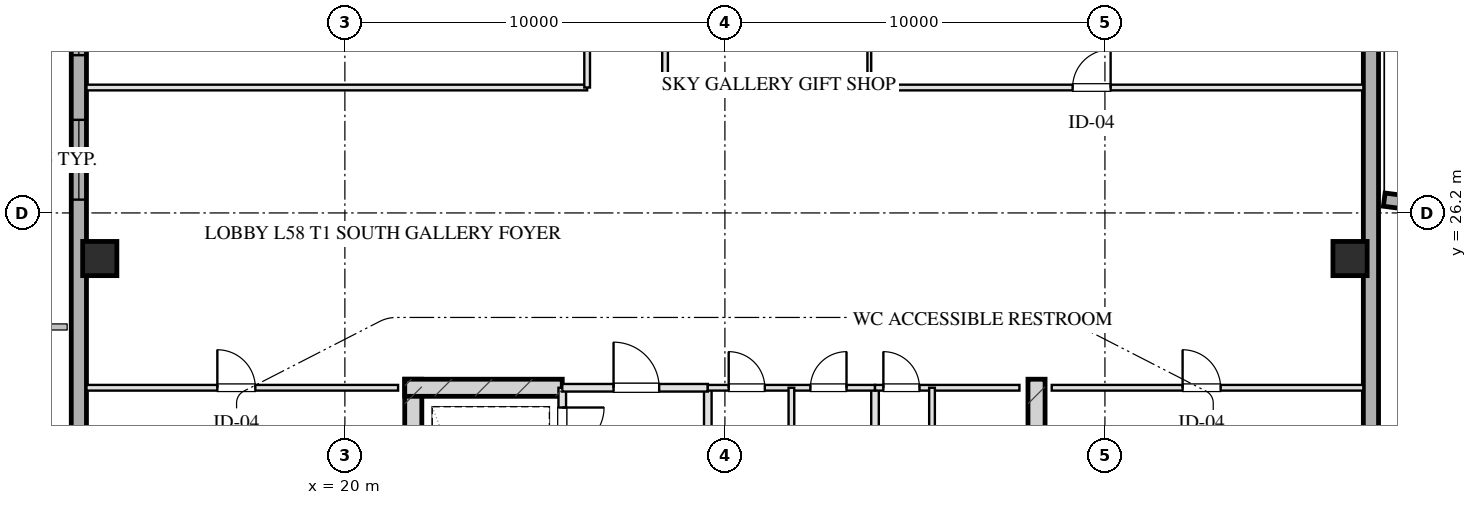
"""IFC4 building model, lengths in metres.
Left out: names, types, materials, properties, quantities, classifications, styles, units other than length and angle.
Written with IfcOpenShell. Run it as: python <this file> out.ifc"""

import sys

from ifc_helpers import new_model, si_unit, direction, frame, frame_2d, origin, origin_2d, place, context, subcontext, project, spatial, rectangle, hollow_rectangle, extrude, element, fill, save


model = new_model("IFC4")
c1 = context("Model", 3, precision=1e-05, world=origin(), true_north=direction((0.0, 1.0)))
c2 = subcontext(c1, "Body", "Model", "MODEL_VIEW")
j1 = project(units=[si_unit("LENGTHUNIT", "METRE"), si_unit("PLANEANGLEUNIT", "RADIAN")], contexts=[c1])
p1 = place(None, origin())
s1 = spatial("IfcSite", under=j1, at=p1, CompositionType="ELEMENT")
p2 = place(p1, origin())
s2 = spatial("IfcBuilding", under=s1, at=p2, CompositionType="ELEMENT")
p3 = place(p2, frame((0.0, 0.0, 216.2)))
s3 = spatial("IfcBuildingStorey", under=s2, at=p3, CompositionType="ELEMENT", Elevation=216.2)
for number, where, z_axis, x_axis in (
    (1, (21.8, 21.825, 0.0), (0.0, 0.0, 1.0), (0.0, -1.0, 0.0)),
    (2, (38.2, 21.825, 0.0), (0.0, 0.0, 1.0), (0.0, -1.0, 0.0)),
):
    element("IfcWall", number, at=place(p3, frame(where, z_axis=z_axis, x_axis=x_axis)), inside=s3, PredefinedType="SHEAR", context=c2, shape_type="SweptSolid", body=[
        extrude(rectangle(XDim=9.33, YDim=0.45, at=frame_2d((4.665, 0.0))), origin(), (0.0, 0.0, 1.0), 3.45),
    ])
p4 = place(p3, frame((21.575, 21.6, 0.0), z_axis=(0.0, 0.0, 1.0), x_axis=(1.0, 0.0, 0.0)))
e3 = element("IfcWall", 3, at=p4, inside=s3, PredefinedType="SHEAR", context=c2, shape_type="SweptSolid", body=[
    extrude(rectangle(XDim=4.145, YDim=0.45, at=frame_2d((2.073, 0.0))), origin(), (0.0, 0.0, 1.0), 3.45),
])
for number, where, z_axis, x_axis in (
    (4, (13.55, 25.0, 0.0), (0.0, 0.0, 1.0), (1.0, 0.0, 0.0)),
    (5, (46.45, 25.0, 0.0), (0.0, 0.0, 1.0), (1.0, 0.0, 0.0)),
):
    element("IfcColumn", number, at=place(p3, frame(where, z_axis=z_axis, x_axis=x_axis)), inside=s3, PredefinedType="COLUMN", context=c2, shape_type="SweptSolid", body=[
        extrude(hollow_rectangle(XDim=0.9, YDim=0.9, WallThickness=0.032, at=origin_2d()), origin(), (0.0, 0.0, 1.0), 3.451),
    ])
p5 = place(p3, frame((13.0, 10.8, 0.0), z_axis=(0.0, 0.0, 1.0), x_axis=(0.0, 1.0, 0.0)))
e6 = element("IfcWall", 6, at=p5, inside=s3, PredefinedType="SOLIDWALL", context=c2, shape_type="SweptSolid", body=[
    extrude(rectangle(XDim=46.4, YDim=0.4, at=frame_2d((23.2, 0.0))), origin(), (0.0, 0.0, 1.0), 2.55),
])
p6 = place(p5, frame((15.75, 0.0, 0.75)))
e7 = element("IfcOpeningElement", 7, at=p6, cuts=e6, PredefinedType="OPENING", context=c2, shape_type="SweptSolid", body=[
    extrude(rectangle(XDim=2.1, YDim=1.4, at=frame_2d((1.05, 0.7))), frame((0.0, 0.21, 0.0), z_axis=(0.0, -1.0, 0.0), x_axis=(1.0, 0.0, 0.0)), (0.0, 0.0, 1.0), 0.42),
])
p7 = place(p5, frame((19.55, 0.0, 0.75)))
e8 = element("IfcOpeningElement", 8, at=p7, cuts=e6, PredefinedType="OPENING", context=c2, shape_type="SweptSolid", body=[
    extrude(rectangle(XDim=2.1, YDim=1.4, at=frame_2d((1.05, 0.7))), frame((0.0, 0.21, 0.0), z_axis=(0.0, -1.0, 0.0), x_axis=(1.0, 0.0, 0.0)), (0.0, 0.0, 1.0), 0.42),
])
p8 = place(p5, frame((24.75, 0.0, 0.75)))
e9 = element("IfcOpeningElement", 9, at=p8, cuts=e6, PredefinedType="OPENING", context=c2, shape_type="SweptSolid", body=[
    extrude(rectangle(XDim=2.1, YDim=1.4, at=frame_2d((1.05, 0.7))), frame((0.0, 0.21, 0.0), z_axis=(0.0, -1.0, 0.0), x_axis=(1.0, 0.0, 0.0)), (0.0, 0.0, 1.0), 0.42),
])
p9 = place(p5, frame((28.55, 0.0, 0.75)))
e10 = element("IfcOpeningElement", 10, at=p9, cuts=e6, PredefinedType="OPENING", context=c2, shape_type="SweptSolid", body=[
    extrude(rectangle(XDim=2.1, YDim=1.4, at=frame_2d((1.05, 0.7))), frame((0.0, 0.21, 0.0), z_axis=(0.0, -1.0, 0.0), x_axis=(1.0, 0.0, 0.0)), (0.0, 0.0, 1.0), 0.42),
])
p10 = place(p3, frame((47.0, 57.2, 0.0), z_axis=(0.0, 0.0, 1.0), x_axis=(0.0, -1.0, 0.0)))
e11 = element("IfcWall", 11, at=p10, inside=s3, PredefinedType="SOLIDWALL", context=c2, shape_type="SweptSolid", body=[
    extrude(rectangle(XDim=46.4, YDim=0.4, at=frame_2d((23.2, 0.0))), origin(), (0.0, 0.0, 1.0), 2.55),
])
p11 = place(p10, frame((16.4, 0.0, 0.0)))
e12 = element("IfcOpeningElement", 12, at=p11, cuts=e11, PredefinedType="OPENING", context=c2, shape_type="SweptSolid", body=[
    extrude(rectangle(XDim=1.8, YDim=2.2, at=frame_2d((0.9, 1.1))), frame((0.0, 0.21, 0.0), z_axis=(0.0, -1.0, 0.0), x_axis=(1.0, 0.0, 0.0)), (0.0, 0.0, 1.0), 0.42),
])
p12 = place(p3, frame((47.35, 26.55, 0.0), z_axis=(0.0, 0.0, 1.0), x_axis=(0.991732402874, -0.128323189996, 0.0)))
e13 = element("IfcWall", 13, at=p12, inside=s3, PredefinedType="SOLIDWALL", context=c2, shape_type="SweptSolid", body=[
    extrude(rectangle(XDim=31.725, YDim=0.35, at=frame_2d((15.862, 0.0))), origin(), (0.0, 0.0, 1.0), 3.15),
])
p13 = place(p3, frame((25.72, 21.6, 0.0), z_axis=(0.0, 0.0, 1.0), x_axis=(0.0, -1.0, 0.0)))
e14 = element("IfcWall", 14, at=p13, inside=s3, PredefinedType="PARTITIONING", context=c2, shape_type="SweptSolid", body=[
    extrude(rectangle(XDim=1.9, YDim=0.2, at=frame_2d((0.95, 0.0))), origin(), (0.0, 0.0, 1.0), 3.155),
])
p14 = place(p13, frame((0.52, 0.0, 0.0)))
e15 = element("IfcOpeningElement", 15, at=p14, cuts=e14, PredefinedType="OPENING", context=c2, shape_type="SweptSolid", body=[
    extrude(rectangle(XDim=1.1, YDim=2.05, at=frame_2d((0.55, 1.025))), frame((0.0, 0.11, 0.0), z_axis=(0.0, -1.0, 0.0), x_axis=(1.0, 0.0, 0.0)), (0.0, 0.0, 1.0), 0.22),
])
p15 = place(p3, frame((29.55, 21.6, 0.0), z_axis=(0.0, 0.0, 1.0), x_axis=(0.0, -1.0, 0.0)))
e16 = element("IfcWall", 16, at=p15, inside=s3, PredefinedType="PARTITIONING", context=c2, shape_type="SweptSolid", body=[
    extrude(rectangle(XDim=8.43, YDim=0.2, at=frame_2d((4.215, 0.0))), origin(), (0.0, 0.0, 1.0), 3.155),
])
p16 = place(p3, frame((25.72, 21.6, 0.0), z_axis=(0.0, 0.0, 1.0), x_axis=(1.0, 0.0, 0.0)))
e17 = element("IfcWall", 17, at=p16, inside=s3, PredefinedType="PARTITIONING", context=c2, shape_type="SweptSolid", body=[
    extrude(rectangle(XDim=3.83, YDim=0.2, at=frame_2d((1.915, 0.0))), origin(), (0.0, 0.0, 1.0), 3.155),
])
p17 = place(p16, frame((1.35, 0.0, 0.0)))
e18 = element("IfcOpeningElement", 18, at=p17, cuts=e17, PredefinedType="OPENING", context=c2, shape_type="SweptSolid", body=[
    extrude(rectangle(XDim=1.2, YDim=2.05, at=frame_2d((0.6, 1.025))), frame((0.0, 0.11, 0.0), z_axis=(0.0, -1.0, 0.0), x_axis=(1.0, 0.0, 0.0)), (0.0, 0.0, 1.0), 0.22),
])
p18 = place(p3, frame((33.95, 21.6, 0.0), z_axis=(0.0, 0.0, 1.0), x_axis=(0.0, -1.0, 0.0)))
e19 = element("IfcWall", 19, at=p18, inside=s3, PredefinedType="PARTITIONING", context=c2, shape_type="SweptSolid", body=[
    extrude(rectangle(XDim=8.43, YDim=0.2, at=frame_2d((4.215, 0.0))), origin(), (0.0, 0.0, 1.0), 3.155),
])
p19 = place(p3, frame((29.55, 21.6, 0.0), z_axis=(0.0, 0.0, 1.0), x_axis=(1.0, 0.0, 0.0)))
e20 = element("IfcWall", 20, at=p19, inside=s3, PredefinedType="PARTITIONING", context=c2, shape_type="SweptSolid", body=[
    extrude(rectangle(XDim=4.4, YDim=0.15, at=frame_2d((2.2, 0.0))), origin(), (0.0, 0.0, 1.0), 3.155),
])
p20 = place(p19, frame((0.55, 0.0, 0.0)))
e21 = element("IfcOpeningElement", 21, at=p20, cuts=e20, PredefinedType="OPENING", context=c2, shape_type="SweptSolid", body=[
    extrude(rectangle(XDim=0.95, YDim=2.05, at=frame_2d((0.475, 1.025))), frame((0.0, 0.085, 0.0), z_axis=(0.0, -1.0, 0.0), x_axis=(1.0, 0.0, 0.0)), (0.0, 0.0, 1.0), 0.17),
])
p21 = place(p19, frame((2.7, 0.0, 0.0)))
e22 = element("IfcOpeningElement", 22, at=p21, cuts=e20, PredefinedType="OPENING", context=c2, shape_type="SweptSolid", body=[
    extrude(rectangle(XDim=0.95, YDim=2.05, at=frame_2d((0.475, 1.025))), frame((0.0, 0.085, 0.0), z_axis=(0.0, -1.0, 0.0), x_axis=(1.0, 0.0, 0.0)), (0.0, 0.0, 1.0), 0.17),
])
p22 = place(p3, frame((31.75, 21.6, 0.0), z_axis=(0.0, 0.0, 1.0), x_axis=(0.0, -1.0, 0.0)))
e23 = element("IfcWall", 23, at=p22, inside=s3, PredefinedType="PARTITIONING", context=c2, shape_type="SweptSolid", body=[
    extrude(rectangle(XDim=8.43, YDim=0.15, at=frame_2d((4.215, 0.0))), origin(), (0.0, 0.0, 1.0), 3.155),
])
p23 = place(p3, frame((33.95, 21.6, 0.0), z_axis=(0.0, 0.0, 1.0), x_axis=(1.0, 0.0, 0.0)))
e24 = element("IfcWall", 24, at=p23, inside=s3, PredefinedType="PARTITIONING", context=c2, shape_type="SweptSolid", body=[
    extrude(rectangle(XDim=3.8, YDim=0.15, at=frame_2d((1.9, 0.0))), origin(), (0.0, 0.0, 1.0), 3.155),
])
p24 = place(p23, frame((0.22, 0.0, 0.0)))
e25 = element("IfcOpeningElement", 25, at=p24, cuts=e24, PredefinedType="OPENING", context=c2, shape_type="SweptSolid", body=[
    extrude(rectangle(XDim=0.95, YDim=2.05, at=frame_2d((0.475, 1.025))), frame((0.0, 0.085, 0.0), z_axis=(0.0, -1.0, 0.0), x_axis=(1.0, 0.0, 0.0)), (0.0, 0.0, 1.0), 0.17),
])
p25 = place(p3, frame((35.45, 21.6, 0.0), z_axis=(0.0, 0.0, 1.0), x_axis=(0.0, -1.0, 0.0)))
e26 = element("IfcWall", 26, at=p25, inside=s3, PredefinedType="PARTITIONING", context=c2, shape_type="SweptSolid", body=[
    extrude(rectangle(XDim=8.43, YDim=0.15, at=frame_2d((4.215, 0.0))), origin(), (0.0, 0.0, 1.0), 2.745),
])
p26 = place(p25, frame((2.55, 0.0, 0.0)))
e27 = element("IfcOpeningElement", 27, at=p26, cuts=e26, PredefinedType="OPENING", context=c2, shape_type="SweptSolid", body=[
    extrude(rectangle(XDim=0.95, YDim=2.05, at=frame_2d((0.475, 1.025))), frame((0.0, 0.085, 0.0), z_axis=(0.0, -1.0, 0.0), x_axis=(1.0, 0.0, 0.0)), (0.0, 0.0, 1.0), 0.17),
])
p27 = place(p25, frame((5.8, 0.0, 0.0)))
e28 = element("IfcOpeningElement", 28, at=p27, cuts=e26, PredefinedType="OPENING", context=c2, shape_type="SweptSolid", body=[
    extrude(rectangle(XDim=0.9, YDim=2.05, at=frame_2d((0.45, 1.025))), frame((0.0, 0.085, 0.0), z_axis=(0.0, -1.0, 0.0), x_axis=(1.0, 0.0, 0.0)), (0.0, 0.0, 1.0), 0.17),
])
p28 = place(p3, frame((13.2, 21.6, 0.0), z_axis=(0.0, 0.0, 1.0), x_axis=(1.0, 0.0, 0.0)))
e29 = element("IfcWall", 29, at=p28, inside=s3, PredefinedType="PARTITIONING", context=c2, shape_type="SweptSolid", body=[
    extrude(rectangle(XDim=8.2, YDim=0.15, at=frame_2d((4.1, 0.0))), origin(), (0.0, 0.0, 1.0), 3.155),
])
p29 = place(p28, frame((3.444, 0.0, 0.0)))
e30 = element("IfcOpeningElement", 30, at=p29, cuts=e29, PredefinedType="OPENING", context=c2, shape_type="SweptSolid", body=[
    extrude(rectangle(XDim=1.0, YDim=2.05, at=frame_2d((0.5, 1.025))), frame((0.0, 0.085, 0.0), z_axis=(0.0, -1.0, 0.0), x_axis=(1.0, 0.0, 0.0)), (0.0, 0.0, 1.0), 0.17),
])
p30 = place(p3, frame((38.6, 21.6, 0.0), z_axis=(0.0, 0.0, 1.0), x_axis=(1.0, 0.0, 0.0)))
e31 = element("IfcWall", 31, at=p30, inside=s3, PredefinedType="PARTITIONING", context=c2, shape_type="SweptSolid", body=[
    extrude(rectangle(XDim=8.2, YDim=0.15, at=frame_2d((4.1, 0.0))), origin(), (0.0, 0.0, 1.0), 3.155),
])
p31 = place(p30, frame((3.444, 0.0, 0.0)))
e32 = element("IfcOpeningElement", 32, at=p31, cuts=e31, PredefinedType="OPENING", context=c2, shape_type="SweptSolid", body=[
    extrude(rectangle(XDim=1.0, YDim=2.05, at=frame_2d((0.5, 1.025))), frame((0.0, 0.085, 0.0), z_axis=(0.0, -1.0, 0.0), x_axis=(1.0, 0.0, 0.0)), (0.0, 0.0, 1.0), 0.17),
])
p32 = place(p3, frame((13.2, 29.5, 0.0), z_axis=(0.0, 0.0, 1.0), x_axis=(1.0, 0.0, 0.0)))
e33 = element("IfcWall", 33, at=p32, inside=s3, PredefinedType="PARTITIONING", context=c2, shape_type="SweptSolid", body=[
    extrude(rectangle(XDim=13.175, YDim=0.15, at=frame_2d((6.587, 0.0))), origin(), (0.0, 0.0, 1.0), 3.155),
])
p33 = place(p3, frame((28.425, 29.5, 0.0), z_axis=(0.0, 0.0, 1.0), x_axis=(1.0, 0.0, 0.0)))
e34 = element("IfcWall", 34, at=p33, inside=s3, PredefinedType="PARTITIONING", context=c2, shape_type="SweptSolid", body=[
    extrude(rectangle(XDim=18.375, YDim=0.15, at=frame_2d((9.188, 0.0))), origin(), (0.0, 0.0, 1.0), 3.155),
])
p34 = place(p33, frame((10.725, 0.0, 0.0)))
e35 = element("IfcOpeningElement", 35, at=p34, cuts=e34, PredefinedType="OPENING", context=c2, shape_type="SweptSolid", body=[
    extrude(rectangle(XDim=1.0, YDim=2.05, at=frame_2d((0.5, 1.025))), frame((0.0, 0.085, 0.0), z_axis=(0.0, -1.0, 0.0), x_axis=(1.0, 0.0, 0.0)), (0.0, 0.0, 1.0), 0.17),
])
p35 = place(p3, frame((26.375, 29.5, 0.0), z_axis=(0.0, 0.0, 1.0), x_axis=(0.0, 1.0, 0.0)))
e36 = element("IfcWall", 36, at=p35, inside=s3, PredefinedType="PARTITIONING", context=c2, shape_type="SweptSolid", body=[
    extrude(rectangle(XDim=9.0, YDim=0.15, at=frame_2d((4.5, 0.0))), origin(), (0.0, 0.0, 1.0), 3.155),
])
p36 = place(p35, frame((1.16, 0.0, 0.0)))
e37 = element("IfcOpeningElement", 37, at=p36, cuts=e36, PredefinedType="OPENING", context=c2, shape_type="SweptSolid", body=[
    extrude(rectangle(XDim=0.85, YDim=2.05, at=frame_2d((0.425, 1.025))), frame((0.0, 0.085, 0.0), z_axis=(0.0, -1.0, 0.0), x_axis=(1.0, 0.0, 0.0)), (0.0, 0.0, 1.0), 0.17),
])
p37 = place(p35, frame((5.66, 0.0, 0.0)))
e38 = element("IfcOpeningElement", 38, at=p37, cuts=e36, PredefinedType="OPENING", context=c2, shape_type="SweptSolid", body=[
    extrude(rectangle(XDim=1.05, YDim=2.05, at=frame_2d((0.525, 1.025))), frame((0.0, 0.085, 0.0), z_axis=(0.0, -1.0, 0.0), x_axis=(1.0, 0.0, 0.0)), (0.0, 0.0, 1.0), 0.17),
])
p38 = place(p3, frame((28.425, 29.5, 0.0), z_axis=(0.0, 0.0, 1.0), x_axis=(0.0, 1.0, 0.0)))
e39 = element("IfcWall", 39, at=p38, inside=s3, PredefinedType="PARTITIONING", context=c2, shape_type="SweptSolid", body=[
    extrude(rectangle(XDim=9.0, YDim=0.15, at=frame_2d((4.5, 0.0))), origin(), (0.0, 0.0, 1.0), 3.155),
])
p39 = place(p38, frame((1.16, 0.0, 0.0)))
e40 = element("IfcOpeningElement", 40, at=p39, cuts=e39, PredefinedType="OPENING", context=c2, shape_type="SweptSolid", body=[
    extrude(rectangle(XDim=1.0, YDim=2.05, at=frame_2d((0.5, 1.025))), frame((0.0, 0.085, 0.0), z_axis=(0.0, -1.0, 0.0), x_axis=(1.0, 0.0, 0.0)), (0.0, 0.0, 1.0), 0.17),
])
p40 = place(p38, frame((5.66, 0.0, 0.0)))
e41 = element("IfcOpeningElement", 41, at=p40, cuts=e39, PredefinedType="OPENING", context=c2, shape_type="SweptSolid", body=[
    extrude(rectangle(XDim=1.0, YDim=2.05, at=frame_2d((0.5, 1.025))), frame((0.0, 0.085, 0.0), z_axis=(0.0, -1.0, 0.0), x_axis=(1.0, 0.0, 0.0)), (0.0, 0.0, 1.0), 0.17),
])
p41 = place(p3, frame((33.8, 29.5, 0.0), z_axis=(0.0, 0.0, 1.0), x_axis=(0.0, 1.0, 0.0)))
e42 = element("IfcWall", 42, at=p41, inside=s3, PredefinedType="MOVABLE", context=c2, shape_type="SweptSolid", body=[
    extrude(rectangle(XDim=3.32, YDim=0.1, at=frame_2d((1.66, 0.0))), origin(), (0.0, 0.0, 1.0), 3.155),
])
p42 = place(p6, origin())
e43 = element("IfcWindow", 43, at=p42, inside=s3, PartitioningType="TRIPLE_PANEL_VERTICAL", PredefinedType="WINDOW", context=c2, shape_type="SweptSolid", body=[
    extrude(rectangle(XDim=2.1, YDim=1.4, at=frame_2d((1.05, 0.7))), frame((0.0, 0.03, 0.0), z_axis=(0.0, -1.0, 0.0), x_axis=(1.0, 0.0, 0.0)), (0.0, 0.0, 1.0), 0.06),
])
fill(e7, e43)
p43 = place(p7, origin())
e44 = element("IfcWindow", 44, at=p43, inside=s3, PartitioningType="TRIPLE_PANEL_VERTICAL", PredefinedType="WINDOW", context=c2, shape_type="SweptSolid", body=[
    extrude(rectangle(XDim=2.1, YDim=1.4, at=frame_2d((1.05, 0.7))), frame((0.0, 0.03, 0.0), z_axis=(0.0, -1.0, 0.0), x_axis=(1.0, 0.0, 0.0)), (0.0, 0.0, 1.0), 0.06),
])
fill(e8, e44)
p44 = place(p14, origin())
e45 = element("IfcDoor", 45, at=p44, inside=s3, OperationType="SINGLE_SWING_LEFT", PredefinedType="DOOR", context=c2, shape_type="SweptSolid", body=[
    extrude(rectangle(XDim=1.1, YDim=2.05, at=frame_2d((0.55, 1.025))), frame((0.0, 0.025, 0.0), z_axis=(0.0, -1.0, 0.0), x_axis=(1.0, 0.0, 0.0)), (0.0, 0.0, 1.0), 0.05),
])
fill(e15, e45)
p45 = place(p17, origin())
e46 = element("IfcDoor", 46, at=p45, inside=s3, OperationType="SINGLE_SWING_LEFT", PredefinedType="DOOR", context=c2, shape_type="SweptSolid", body=[
    extrude(rectangle(XDim=1.2, YDim=2.05, at=frame_2d((0.6, 1.025))), frame((0.0, 0.025, 0.0), z_axis=(0.0, -1.0, 0.0), x_axis=(1.0, 0.0, 0.0)), (0.0, 0.0, 1.0), 0.05),
])
fill(e18, e46)
p46 = place(p20, origin())
e47 = element("IfcDoor", 47, at=p46, inside=s3, OperationType="SINGLE_SWING_LEFT", PredefinedType="DOOR", context=c2, shape_type="SweptSolid", body=[
    extrude(rectangle(XDim=0.95, YDim=2.05, at=frame_2d((0.475, 1.025))), frame((0.0, 0.025, 0.0), z_axis=(0.0, -1.0, 0.0), x_axis=(1.0, 0.0, 0.0)), (0.0, 0.0, 1.0), 0.05),
])
fill(e21, e47)
p47 = place(p21, origin())
e48 = element("IfcDoor", 48, at=p47, inside=s3, OperationType="SINGLE_SWING_RIGHT", PredefinedType="DOOR", context=c2, shape_type="SweptSolid", body=[
    extrude(rectangle(XDim=0.95, YDim=2.05, at=frame_2d((0.475, 1.025))), frame((0.0, 0.025, 0.0), z_axis=(0.0, -1.0, 0.0), x_axis=(1.0, 0.0, 0.0)), (0.0, 0.0, 1.0), 0.05),
])
fill(e22, e48)
p48 = place(p24, origin())
e49 = element("IfcDoor", 49, at=p48, inside=s3, OperationType="SINGLE_SWING_LEFT", PredefinedType="DOOR", context=c2, shape_type="SweptSolid", body=[
    extrude(rectangle(XDim=0.95, YDim=2.05, at=frame_2d((0.475, 1.025))), frame((0.0, 0.025, 0.0), z_axis=(0.0, -1.0, 0.0), x_axis=(1.0, 0.0, 0.0)), (0.0, 0.0, 1.0), 0.05),
])
fill(e25, e49)
p49 = place(p29, origin())
e50 = element("IfcDoor", 50, at=p49, inside=s3, OperationType="SINGLE_SWING_LEFT", PredefinedType="DOOR", context=c2, shape_type="SweptSolid", body=[
    extrude(rectangle(XDim=1.0, YDim=2.05, at=frame_2d((0.5, 1.025))), frame((0.0, 0.025, 0.0), z_axis=(0.0, -1.0, 0.0), x_axis=(1.0, 0.0, 0.0)), (0.0, 0.0, 1.0), 0.05),
])
fill(e30, e50)
p50 = place(p31, origin())
e51 = element("IfcDoor", 51, at=p50, inside=s3, OperationType="SINGLE_SWING_LEFT", PredefinedType="DOOR", context=c2, shape_type="SweptSolid", body=[
    extrude(rectangle(XDim=1.0, YDim=2.05, at=frame_2d((0.5, 1.025))), frame((0.0, 0.025, 0.0), z_axis=(0.0, -1.0, 0.0), x_axis=(1.0, 0.0, 0.0)), (0.0, 0.0, 1.0), 0.05),
])
fill(e32, e51)
p51 = place(p34, origin())
e52 = element("IfcDoor", 52, at=p51, inside=s3, OperationType="SINGLE_SWING_RIGHT", PredefinedType="DOOR", context=c2, shape_type="SweptSolid", body=[
    extrude(rectangle(XDim=1.0, YDim=2.05, at=frame_2d((0.5, 1.025))), frame((0.0, 0.025, 0.0), z_axis=(0.0, -1.0, 0.0), x_axis=(1.0, 0.0, 0.0)), (0.0, 0.0, 1.0), 0.05),
])
fill(e35, e52)
save(model, sys.argv[1])
